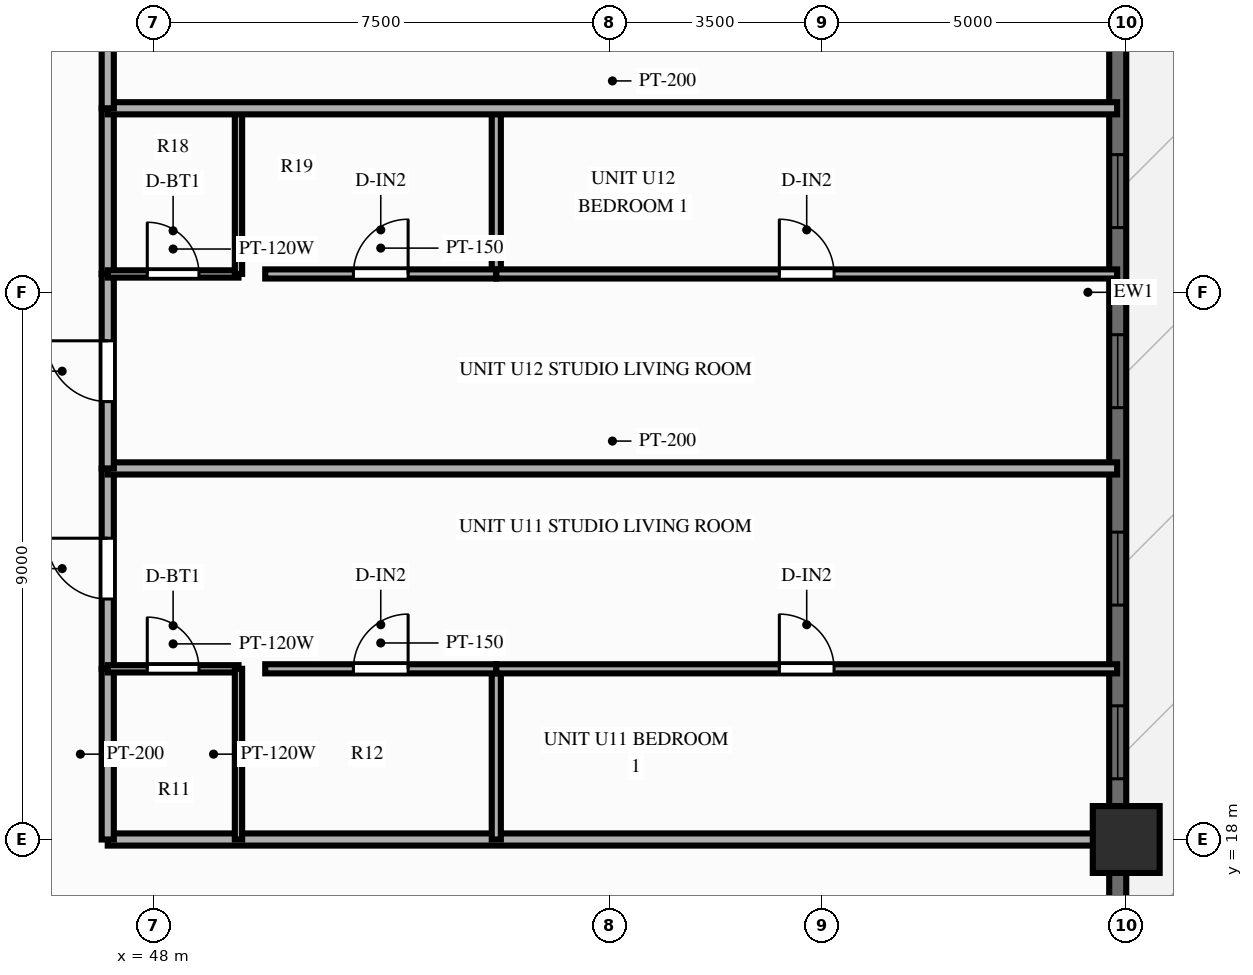
"""IFC4 building model, lengths in metres.
Left out: names, types, materials, properties, quantities, classifications, styles, units other than length and angle.
Written with IfcOpenShell. Run it as: python <this file> out.ifc"""

import sys

from ifc_helpers import new_model, si_unit, direction, frame, frame_2d, origin, origin_2d, place, context, subcontext, project, spatial, rectangle, extrude, source, transform, mapped, element, fill, save


model = new_model("IFC4")
c1 = context("Model", 3, precision=1e-05, world=origin(), true_north=direction((0.0, 1.0)))
c2 = subcontext(c1, "Body", "Model", "MODEL_VIEW")
j1 = project(units=[si_unit("LENGTHUNIT", "METRE"), si_unit("PLANEANGLEUNIT", "RADIAN")], contexts=[c1])
p1 = place(None, origin())
s1 = spatial("IfcSite", under=j1, at=p1, CompositionType="ELEMENT")
p2 = place(p1, origin())
s2 = spatial("IfcBuilding", under=s1, at=p2, CompositionType="ELEMENT")
p3 = place(p2, frame((0.0, 0.0, 43.4)))
s3 = spatial("IfcBuildingStorey", under=s2, at=p3, CompositionType="ELEMENT", Elevation=43.4)
m1 = source(origin(), c2, "Body", "SweptSolid", [
    extrude(rectangle(XDim=1.1, YDim=1.1, at=origin_2d()), origin(), (0.0, 0.0, 1.0), 3.0),
])
p4 = place(p3, frame((64.0, 18.0, 0.0), z_axis=(0.0, 0.0, 1.0), x_axis=(1.0, 0.0, 0.0)))
e1 = element("IfcColumn", 1, at=p4, inside=s3, PredefinedType="COLUMN", context=c2, shape_type="MappedRepresentation", body=[
    mapped(m1, transform((0.0, 0.0, 0.0), scale=1.0)),
])
p5 = place(p3, frame((63.86, 6.5, 0.0), z_axis=(0.0, 0.0, 1.0), x_axis=(0.0, 1.0, 0.0)))
e2 = element("IfcWall", 2, at=p5, inside=s3, PredefinedType="SOLIDWALL", context=c2, shape_type="SweptSolid", body=[
    extrude(rectangle(XDim=41.0, YDim=0.28, at=frame_2d((20.5, 0.0))), origin(), (0.0, 0.0, 1.0), 2.28),
])
p6 = place(p5, frame((5.15, 0.0, 0.25)))
e3 = element("IfcOpeningElement", 3, at=p6, cuts=e2, PredefinedType="OPENING", context=c2, shape_type="SweptSolid", body=[
    extrude(rectangle(XDim=1.2, YDim=1.5, at=frame_2d((0.6, 0.75))), frame((0.0, 0.152, 0.0), z_axis=(0.0, -1.0, 0.0), x_axis=(1.0, 0.0, 0.0)), (0.0, 0.0, 1.0), 0.304),
])
p7 = place(p5, frame((12.499, 0.0, 0.25)))
e4 = element("IfcOpeningElement", 4, at=p7, cuts=e2, PredefinedType="OPENING", context=c2, shape_type="SweptSolid", body=[
    extrude(rectangle(XDim=1.2, YDim=1.5, at=frame_2d((0.6, 0.75))), frame((0.0, 0.152, 0.0), z_axis=(0.0, -1.0, 0.0), x_axis=(1.0, 0.0, 0.0)), (0.0, 0.0, 1.0), 0.304),
])
p8 = place(p5, frame((15.355, 0.0, 0.25)))
e5 = element("IfcOpeningElement", 5, at=p8, cuts=e2, PredefinedType="OPENING", context=c2, shape_type="SweptSolid", body=[
    extrude(rectangle(XDim=1.2, YDim=1.5, at=frame_2d((0.6, 0.75))), frame((0.0, 0.152, 0.0), z_axis=(0.0, -1.0, 0.0), x_axis=(1.0, 0.0, 0.0)), (0.0, 0.0, 1.0), 0.304),
])
p9 = place(p5, frame((18.602, 0.0, 0.25)))
e6 = element("IfcOpeningElement", 6, at=p9, cuts=e2, PredefinedType="OPENING", context=c2, shape_type="SweptSolid", body=[
    extrude(rectangle(XDim=1.2, YDim=1.5, at=frame_2d((0.6, 0.75))), frame((0.0, 0.152, 0.0), z_axis=(0.0, -1.0, 0.0), x_axis=(1.0, 0.0, 0.0)), (0.0, 0.0, 1.0), 0.304),
])
p10 = place(p5, frame((21.564, 0.0, 0.25)))
e7 = element("IfcOpeningElement", 7, at=p10, cuts=e2, PredefinedType="OPENING", context=c2, shape_type="SweptSolid", body=[
    extrude(rectangle(XDim=1.2, YDim=1.5, at=frame_2d((0.6, 0.75))), frame((0.0, 0.152, 0.0), z_axis=(0.0, -1.0, 0.0), x_axis=(1.0, 0.0, 0.0)), (0.0, 0.0, 1.0), 0.304),
])
p11 = place(p5, frame((24.526, 0.0, 0.25)))
e8 = element("IfcOpeningElement", 8, at=p11, cuts=e2, PredefinedType="OPENING", context=c2, shape_type="SweptSolid", body=[
    extrude(rectangle(XDim=1.2, YDim=1.5, at=frame_2d((0.6, 0.75))), frame((0.0, 0.152, 0.0), z_axis=(0.0, -1.0, 0.0), x_axis=(1.0, 0.0, 0.0)), (0.0, 0.0, 1.0), 0.304),
])
p12 = place(p5, frame((27.318, 0.0, 0.25)))
e9 = element("IfcOpeningElement", 9, at=p12, cuts=e2, PredefinedType="OPENING", context=c2, shape_type="SweptSolid", body=[
    extrude(rectangle(XDim=1.2, YDim=1.5, at=frame_2d((0.6, 0.75))), frame((0.0, 0.152, 0.0), z_axis=(0.0, -1.0, 0.0), x_axis=(1.0, 0.0, 0.0)), (0.0, 0.0, 1.0), 0.304),
])
p13 = place(p5, frame((36.05, 0.0, 0.0), z_axis=(0.0, 0.0, 1.0), x_axis=(-1.0, 0.0, 0.0)))
e10 = element("IfcOpeningElement", 10, at=p13, cuts=e2, PredefinedType="OPENING", context=c2, shape_type="SweptSolid", body=[
    extrude(rectangle(XDim=1.6, YDim=2.15, at=frame_2d((0.8, 1.075))), frame((0.0, 0.152, 0.0), z_axis=(0.0, -1.0, 0.0), x_axis=(1.0, 0.0, 0.0)), (0.0, 0.0, 1.0), 0.304),
])
p14 = place(p3, frame((47.25, 18.0, 0.0), z_axis=(0.0, 0.0, 1.0), x_axis=(1.0, 0.0, 0.0)))
e11 = element("IfcWall", 11, at=p14, inside=s3, PredefinedType="PARTITIONING", context=c2, shape_type="SweptSolid", body=[
    extrude(rectangle(XDim=16.6, YDim=0.2, at=frame_2d((8.3, 0.0))), origin(), (0.0, 0.0, 1.0), 2.24),
])
p15 = place(p3, frame((47.25, 18.0, 0.0), z_axis=(0.0, 0.0, 1.0), x_axis=(0.0, 1.0, 0.0)))
e12 = element("IfcWall", 12, at=p15, inside=s3, PredefinedType="PARTITIONING", context=c2, shape_type="SweptSolid", body=[
    extrude(rectangle(XDim=2.807, YDim=0.2, at=frame_2d((1.404, 0.0))), origin(), (0.0, 0.0, 1.0), 2.79),
])
p16 = place(p3, frame((47.25, 20.807, 0.0), z_axis=(0.0, 0.0, 1.0), x_axis=(0.0, 1.0, 0.0)))
e13 = element("IfcWall", 13, at=p16, inside=s3, PredefinedType="PARTITIONING", context=c2, shape_type="SweptSolid", body=[
    extrude(rectangle(XDim=3.296, YDim=0.2, at=frame_2d((1.648, 0.0))), origin(), (0.0, 0.0, 1.0), 2.79),
])
p17 = place(p16, frame((1.148, 0.0, 0.0)))
e14 = element("IfcOpeningElement", 14, at=p17, cuts=e13, PredefinedType="OPENING", context=c2, shape_type="SweptSolid", body=[
    extrude(rectangle(XDim=1.0, YDim=2.15, at=frame_2d((0.5, 1.075))), frame((0.0, 0.112, 0.0), z_axis=(0.0, -1.0, 0.0), x_axis=(1.0, 0.0, 0.0)), (0.0, 0.0, 1.0), 0.224),
])
p18 = place(p3, frame((47.25, 20.807, 0.0), z_axis=(0.0, 0.0, 1.0), x_axis=(1.0, 0.0, 0.0)))
e15 = element("IfcWall", 15, at=p18, inside=s3, PredefinedType="PARTITIONING", context=c2, shape_type="SweptSolid", body=[
    extrude(rectangle(XDim=2.15, YDim=0.12, at=frame_2d((1.075, 0.0))), origin(), (0.0, 0.0, 1.0), 2.79),
])
p19 = place(p18, frame((0.65, 0.0, 0.0)))
e16 = element("IfcOpeningElement", 16, at=p19, cuts=e15, PredefinedType="OPENING", context=c2, shape_type="SweptSolid", body=[
    extrude(rectangle(XDim=0.85, YDim=2.05, at=frame_2d((0.425, 1.025))), frame((0.0, 0.072, 0.0), z_axis=(0.0, -1.0, 0.0), x_axis=(1.0, 0.0, 0.0)), (0.0, 0.0, 1.0), 0.144),
])
p20 = place(p3, frame((49.4, 18.0, 0.0), z_axis=(0.0, 0.0, 1.0), x_axis=(0.0, 1.0, 0.0)))
e17 = element("IfcWall", 17, at=p20, inside=s3, PredefinedType="PARTITIONING", context=c2, shape_type="SweptSolid", body=[
    extrude(rectangle(XDim=2.807, YDim=0.12, at=frame_2d((1.404, 0.0))), origin(), (0.0, 0.0, 1.0), 2.79),
])
p21 = place(p3, frame((53.64, 18.0, 0.0), z_axis=(0.0, 0.0, 1.0), x_axis=(0.0, 1.0, 0.0)))
e18 = element("IfcWall", 18, at=p21, inside=s3, PredefinedType="PARTITIONING", context=c2, shape_type="SweptSolid", body=[
    extrude(rectangle(XDim=2.807, YDim=0.15, at=frame_2d((1.404, 0.0))), origin(), (0.0, 0.0, 1.0), 2.79),
])
p22 = place(p3, frame((49.84, 20.807, 0.0), z_axis=(0.0, 0.0, 1.0), x_axis=(1.0, 0.0, 0.0)))
e19 = element("IfcWall", 19, at=p22, inside=s3, PredefinedType="PARTITIONING", context=c2, shape_type="SweptSolid", body=[
    extrude(rectangle(XDim=3.8, YDim=0.15, at=frame_2d((1.9, 0.0))), origin(), (0.0, 0.0, 1.0), 2.79),
])
p23 = place(p22, frame((1.45, 0.0, 0.0)))
e20 = element("IfcOpeningElement", 20, at=p23, cuts=e19, PredefinedType="OPENING", context=c2, shape_type="SweptSolid", body=[
    extrude(rectangle(XDim=0.9, YDim=2.1, at=frame_2d((0.45, 1.05))), frame((0.0, 0.087, 0.0), z_axis=(0.0, -1.0, 0.0), x_axis=(1.0, 0.0, 0.0)), (0.0, 0.0, 1.0), 0.174),
])
p24 = place(p3, frame((53.64, 20.807, 0.0), z_axis=(0.0, 0.0, 1.0), x_axis=(1.0, 0.0, 0.0)))
e21 = element("IfcWall", 21, at=p24, inside=s3, PredefinedType="PARTITIONING", context=c2, shape_type="SweptSolid", body=[
    extrude(rectangle(XDim=10.21, YDim=0.15, at=frame_2d((5.105, 0.0))), origin(), (0.0, 0.0, 1.0), 2.79),
])
p25 = place(p24, frame((4.655, 0.0, 0.0)))
e22 = element("IfcOpeningElement", 22, at=p25, cuts=e21, PredefinedType="OPENING", context=c2, shape_type="SweptSolid", body=[
    extrude(rectangle(XDim=0.9, YDim=2.1, at=frame_2d((0.45, 1.05))), frame((0.0, 0.087, 0.0), z_axis=(0.0, -1.0, 0.0), x_axis=(1.0, 0.0, 0.0)), (0.0, 0.0, 1.0), 0.174),
])
p26 = place(p3, frame((47.25, 24.103, 0.0), z_axis=(0.0, 0.0, 1.0), x_axis=(1.0, 0.0, 0.0)))
e23 = element("IfcWall", 23, at=p26, inside=s3, PredefinedType="PARTITIONING", context=c2, shape_type="SweptSolid", body=[
    extrude(rectangle(XDim=16.6, YDim=0.2, at=frame_2d((8.3, 0.0))), origin(), (0.0, 0.0, 1.0), 2.79),
])
p27 = place(p3, frame((47.25, 24.103, 0.0), z_axis=(0.0, 0.0, 1.0), x_axis=(0.0, 1.0, 0.0)))
e24 = element("IfcWall", 24, at=p27, inside=s3, PredefinedType="PARTITIONING", context=c2, shape_type="SweptSolid", body=[
    extrude(rectangle(XDim=3.199, YDim=0.2, at=frame_2d((1.599, 0.0))), origin(), (0.0, 0.0, 1.0), 2.79),
])
p28 = place(p27, frame((1.099, 0.0, 0.0)))
e25 = element("IfcOpeningElement", 25, at=p28, cuts=e24, PredefinedType="OPENING", context=c2, shape_type="SweptSolid", body=[
    extrude(rectangle(XDim=1.0, YDim=2.15, at=frame_2d((0.5, 1.075))), frame((0.0, 0.112, 0.0), z_axis=(0.0, -1.0, 0.0), x_axis=(1.0, 0.0, 0.0)), (0.0, 0.0, 1.0), 0.224),
])
p29 = place(p3, frame((47.25, 27.302, 0.0), z_axis=(0.0, 0.0, 1.0), x_axis=(0.0, 1.0, 0.0)))
e26 = element("IfcWall", 26, at=p29, inside=s3, PredefinedType="PARTITIONING", context=c2, shape_type="SweptSolid", body=[
    extrude(rectangle(XDim=2.725, YDim=0.2, at=frame_2d((1.362, 0.0))), origin(), (0.0, 0.0, 1.0), 2.79),
])
p30 = place(p3, frame((47.25, 27.302, 0.0), z_axis=(0.0, 0.0, 1.0), x_axis=(1.0, 0.0, 0.0)))
e27 = element("IfcWall", 27, at=p30, inside=s3, PredefinedType="PARTITIONING", context=c2, shape_type="SweptSolid", body=[
    extrude(rectangle(XDim=2.15, YDim=0.12, at=frame_2d((1.075, 0.0))), origin(), (0.0, 0.0, 1.0), 2.79),
])
p31 = place(p30, frame((0.65, 0.0, 0.0)))
e28 = element("IfcOpeningElement", 28, at=p31, cuts=e27, PredefinedType="OPENING", context=c2, shape_type="SweptSolid", body=[
    extrude(rectangle(XDim=0.85, YDim=2.05, at=frame_2d((0.425, 1.025))), frame((0.0, 0.072, 0.0), z_axis=(0.0, -1.0, 0.0), x_axis=(1.0, 0.0, 0.0)), (0.0, 0.0, 1.0), 0.144),
])
p32 = place(p3, frame((49.4, 27.302, 0.0), z_axis=(0.0, 0.0, 1.0), x_axis=(0.0, 1.0, 0.0)))
e29 = element("IfcWall", 29, at=p32, inside=s3, PredefinedType="PARTITIONING", context=c2, shape_type="SweptSolid", body=[
    extrude(rectangle(XDim=2.725, YDim=0.12, at=frame_2d((1.362, 0.0))), origin(), (0.0, 0.0, 1.0), 2.79),
])
p33 = place(p3, frame((53.64, 27.302, 0.0), z_axis=(0.0, 0.0, 1.0), x_axis=(0.0, 1.0, 0.0)))
e30 = element("IfcWall", 30, at=p33, inside=s3, PredefinedType="PARTITIONING", context=c2, shape_type="SweptSolid", body=[
    extrude(rectangle(XDim=2.725, YDim=0.15, at=frame_2d((1.362, 0.0))), origin(), (0.0, 0.0, 1.0), 2.79),
])
p34 = place(p3, frame((49.84, 27.302, 0.0), z_axis=(0.0, 0.0, 1.0), x_axis=(1.0, 0.0, 0.0)))
e31 = element("IfcWall", 31, at=p34, inside=s3, PredefinedType="PARTITIONING", context=c2, shape_type="SweptSolid", body=[
    extrude(rectangle(XDim=3.8, YDim=0.15, at=frame_2d((1.9, 0.0))), origin(), (0.0, 0.0, 1.0), 2.79),
])
p35 = place(p34, frame((1.45, 0.0, 0.0)))
e32 = element("IfcOpeningElement", 32, at=p35, cuts=e31, PredefinedType="OPENING", context=c2, shape_type="SweptSolid", body=[
    extrude(rectangle(XDim=0.9, YDim=2.1, at=frame_2d((0.45, 1.05))), frame((0.0, 0.087, 0.0), z_axis=(0.0, -1.0, 0.0), x_axis=(1.0, 0.0, 0.0)), (0.0, 0.0, 1.0), 0.174),
])
p36 = place(p3, frame((53.64, 27.302, 0.0), z_axis=(0.0, 0.0, 1.0), x_axis=(1.0, 0.0, 0.0)))
e33 = element("IfcWall", 33, at=p36, inside=s3, PredefinedType="PARTITIONING", context=c2, shape_type="SweptSolid", body=[
    extrude(rectangle(XDim=10.21, YDim=0.15, at=frame_2d((5.105, 0.0))), origin(), (0.0, 0.0, 1.0), 2.79),
])
p37 = place(p36, frame((4.655, 0.0, 0.0)))
e34 = element("IfcOpeningElement", 34, at=p37, cuts=e33, PredefinedType="OPENING", context=c2, shape_type="SweptSolid", body=[
    extrude(rectangle(XDim=0.9, YDim=2.1, at=frame_2d((0.45, 1.05))), frame((0.0, 0.087, 0.0), z_axis=(0.0, -1.0, 0.0), x_axis=(1.0, 0.0, 0.0)), (0.0, 0.0, 1.0), 0.174),
])
p38 = place(p3, frame((47.25, 30.027, 0.0), z_axis=(0.0, 0.0, 1.0), x_axis=(1.0, 0.0, 0.0)))
e35 = element("IfcWall", 35, at=p38, inside=s3, PredefinedType="PARTITIONING", context=c2, shape_type="SweptSolid", body=[
    extrude(rectangle(XDim=16.6, YDim=0.2, at=frame_2d((8.3, 0.0))), origin(), (0.0, 0.0, 1.0), 2.79),
])
p39 = place(p3, frame((47.25, 30.027, 0.0), z_axis=(0.0, 0.0, 1.0), x_axis=(0.0, 1.0, 0.0)))
e36 = element("IfcWall", 36, at=p39, inside=s3, PredefinedType="PARTITIONING", context=c2, shape_type="SweptSolid", body=[
    extrude(rectangle(XDim=3.198, YDim=0.2, at=frame_2d((1.599, 0.0))), origin(), (0.0, 0.0, 1.0), 2.79),
])
p40 = place(p39, frame((1.099, 0.0, 0.0)))
e37 = element("IfcOpeningElement", 37, at=p40, cuts=e36, PredefinedType="OPENING", context=c2, shape_type="SweptSolid", body=[
    extrude(rectangle(XDim=1.0, YDim=2.15, at=frame_2d((0.5, 1.075))), frame((0.0, 0.112, 0.0), z_axis=(0.0, -1.0, 0.0), x_axis=(1.0, 0.0, 0.0)), (0.0, 0.0, 1.0), 0.224),
])
m2 = source(origin(), c2, "Body", "SweptSolid", [
    extrude(rectangle(XDim=1.2, YDim=1.5, at=frame_2d((0.6, 0.75))), frame((0.0, 0.03, 0.0), z_axis=(0.0, -1.0, 0.0), x_axis=(1.0, 0.0, 0.0)), (0.0, 0.0, 1.0), 0.06),
])
p41 = place(p7, origin())
e38 = element("IfcWindow", 38, at=p41, inside=s3, PartitioningType="SINGLE_PANEL", PredefinedType="WINDOW", context=c2, shape_type="MappedRepresentation", body=[
    mapped(m2, transform((0.0, 0.0, 0.0), scale=1.0)),
])
fill(e4, e38)
p42 = place(p8, origin())
e39 = element("IfcWindow", 39, at=p42, inside=s3, PartitioningType="SINGLE_PANEL", PredefinedType="WINDOW", context=c2, shape_type="MappedRepresentation", body=[
    mapped(m2, transform((0.0, 0.0, 0.0), scale=1.0)),
])
fill(e5, e39)
p43 = place(p9, origin())
e40 = element("IfcWindow", 40, at=p43, inside=s3, PartitioningType="SINGLE_PANEL", PredefinedType="WINDOW", context=c2, shape_type="MappedRepresentation", body=[
    mapped(m2, transform((0.0, 0.0, 0.0), scale=1.0)),
])
fill(e6, e40)
p44 = place(p10, origin())
e41 = element("IfcWindow", 41, at=p44, inside=s3, PartitioningType="SINGLE_PANEL", PredefinedType="WINDOW", context=c2, shape_type="MappedRepresentation", body=[
    mapped(m2, transform((0.0, 0.0, 0.0), scale=1.0)),
])
fill(e7, e41)
m3 = source(origin(), c2, "Body", "SweptSolid", [
    extrude(rectangle(XDim=1.0, YDim=2.15, at=frame_2d((0.5, 1.075))), frame((0.0, 0.025, 0.0), z_axis=(0.0, -1.0, 0.0), x_axis=(1.0, 0.0, 0.0)), (0.0, 0.0, 1.0), 0.05),
])
p45 = place(p17, origin())
e42 = element("IfcDoor", 42, at=p45, inside=s3, OperationType="SINGLE_SWING_RIGHT", PredefinedType="DOOR", context=c2, shape_type="MappedRepresentation", body=[
    mapped(m3, transform((0.0, 0.0, 0.0), scale=1.0)),
])
fill(e14, e42)
m4 = source(origin(), c2, "Body", "SweptSolid", [
    extrude(rectangle(XDim=0.85, YDim=2.05, at=frame_2d((0.425, 1.025))), frame((0.0, 0.025, 0.0), z_axis=(0.0, -1.0, 0.0), x_axis=(1.0, 0.0, 0.0)), (0.0, 0.0, 1.0), 0.05),
])
p46 = place(p19, origin())
e43 = element("IfcDoor", 43, at=p46, inside=s3, OperationType="SINGLE_SWING_LEFT", PredefinedType="DOOR", context=c2, shape_type="MappedRepresentation", body=[
    mapped(m4, transform((0.0, 0.0, 0.0), scale=1.0)),
])
fill(e16, e43)
m5 = source(origin(), c2, "Body", "SweptSolid", [
    extrude(rectangle(XDim=0.9, YDim=2.1, at=frame_2d((0.45, 1.05))), frame((0.0, 0.025, 0.0), z_axis=(0.0, -1.0, 0.0), x_axis=(1.0, 0.0, 0.0)), (0.0, 0.0, 1.0), 0.05),
])
p47 = place(p23, origin())
e44 = element("IfcDoor", 44, at=p47, inside=s3, OperationType="SINGLE_SWING_RIGHT", PredefinedType="DOOR", context=c2, shape_type="MappedRepresentation", body=[
    mapped(m5, transform((0.0, 0.0, 0.0), scale=1.0)),
])
fill(e20, e44)
p48 = place(p25, origin())
e45 = element("IfcDoor", 45, at=p48, inside=s3, OperationType="SINGLE_SWING_LEFT", PredefinedType="DOOR", context=c2, shape_type="MappedRepresentation", body=[
    mapped(m5, transform((0.0, 0.0, 0.0), scale=1.0)),
])
fill(e22, e45)
p49 = place(p28, origin())
e46 = element("IfcDoor", 46, at=p49, inside=s3, OperationType="SINGLE_SWING_RIGHT", PredefinedType="DOOR", context=c2, shape_type="MappedRepresentation", body=[
    mapped(m3, transform((0.0, 0.0, 0.0), scale=1.0)),
])
fill(e25, e46)
p50 = place(p31, origin())
e47 = element("IfcDoor", 47, at=p50, inside=s3, OperationType="SINGLE_SWING_LEFT", PredefinedType="DOOR", context=c2, shape_type="MappedRepresentation", body=[
    mapped(m4, transform((0.0, 0.0, 0.0), scale=1.0)),
])
fill(e28, e47)
p51 = place(p35, origin())
e48 = element("IfcDoor", 48, at=p51, inside=s3, OperationType="SINGLE_SWING_RIGHT", PredefinedType="DOOR", context=c2, shape_type="MappedRepresentation", body=[
    mapped(m5, transform((0.0, 0.0, 0.0), scale=1.0)),
])
fill(e32, e48)
p52 = place(p37, origin())
e49 = element("IfcDoor", 49, at=p52, inside=s3, OperationType="SINGLE_SWING_LEFT", PredefinedType="DOOR", context=c2, shape_type="MappedRepresentation", body=[
    mapped(m5, transform((0.0, 0.0, 0.0), scale=1.0)),
])
fill(e34, e49)
save(model, sys.argv[1])
